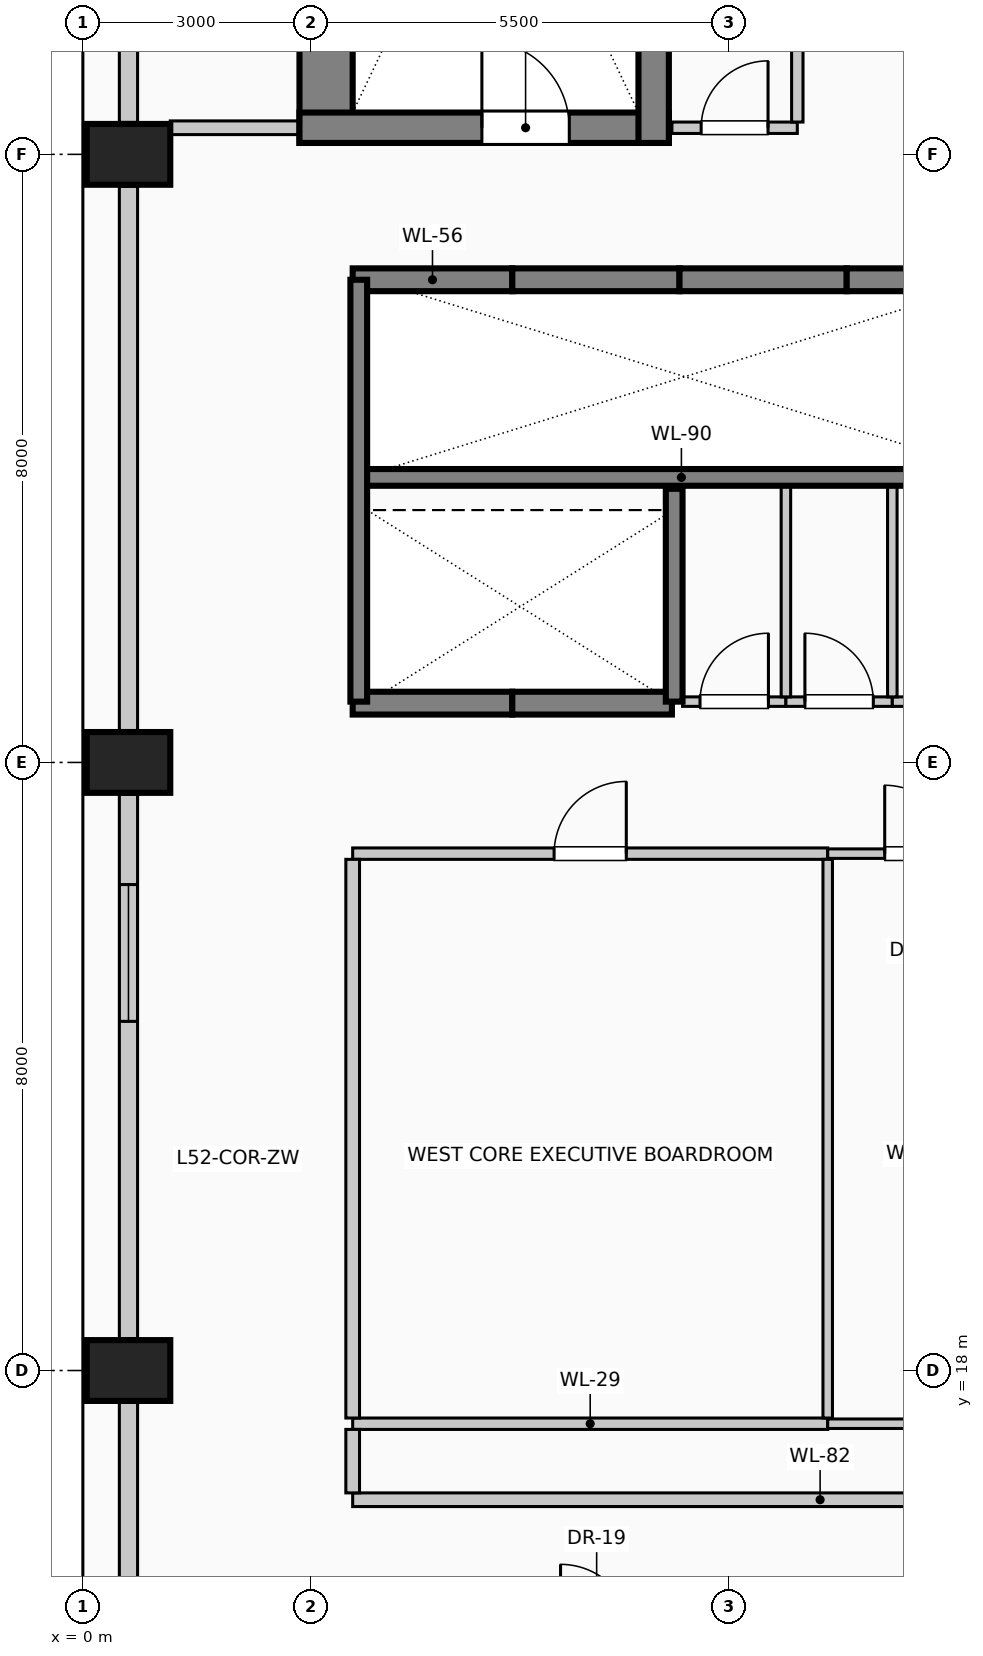
"""IFC4 building model, lengths in metres.
Left out: names, types, materials, properties, quantities, classifications, styles, units other than length and angle.
Written with IfcOpenShell. Run it as: python <this file> out.ifc"""

import sys

from ifc_helpers import new_model, si_unit, direction, frame, frame_2d, origin, origin_2d, place, context, subcontext, project, spatial, rectangle, extrude, element, fill, save


model = new_model("IFC4")
c1 = context("Model", 3, precision=1e-05, world=origin(), true_north=direction((0.0, 1.0)))
c2 = subcontext(c1, "Body", "Model", "MODEL_VIEW")
j1 = project(units=[si_unit("LENGTHUNIT", "METRE"), si_unit("PLANEANGLEUNIT", "RADIAN")], contexts=[c1])
p1 = place(None, origin())
s1 = spatial("IfcSite", under=j1, at=p1, CompositionType="ELEMENT")
p2 = place(p1, origin())
s2 = spatial("IfcBuilding", under=s1, at=p2, CompositionType="ELEMENT")
p3 = place(p2, frame((0.0, 0.0, 214.6)))
s3 = spatial("IfcBuildingStorey", under=s2, at=p3, CompositionType="ELEMENT", Elevation=214.6)
p4 = place(p3, frame((3.2, 34.15, 0.0), z_axis=(0.0, 0.0, 1.0), x_axis=(0.0, 1.0, 0.0)))
e1 = element("IfcWall", 1, at=p4, inside=s3, PredefinedType="SHEAR", context=c2, shape_type="SweptSolid", body=[
    extrude(rectangle(XDim=8.98, YDim=0.7, at=frame_2d((4.49, 0.0))), origin(), (0.0, 0.0, 1.0), 4.0),
])
p5 = place(p3, frame((2.85, 34.35, 0.0), z_axis=(0.0, 0.0, 1.0), x_axis=(1.0, 0.0, 0.0)))
e2 = element("IfcWall", 2, at=p5, inside=s3, PredefinedType="SHEAR", context=c2, shape_type="SweptSolid", body=[
    extrude(rectangle(XDim=4.86, YDim=0.4, at=frame_2d((2.43, 0.0))), origin(), (0.0, 0.0, 1.0), 4.0),
])
p6 = place(p5, frame((2.4, 0.0, 0.0)))
e3 = element("IfcOpeningElement", 3, at=p6, cuts=e2, PredefinedType="OPENING", context=c2, shape_type="SweptSolid", body=[
    extrude(rectangle(XDim=1.15, YDim=2.2, at=frame_2d((0.575, 1.1))), frame((0.0, 0.21, 0.0), z_axis=(0.0, -1.0, 0.0), x_axis=(1.0, 0.0, 0.0)), (0.0, 0.0, 1.0), 0.42),
])
p7 = place(p3, frame((7.51, 34.15, 0.0), z_axis=(0.0, 0.0, 1.0), x_axis=(0.0, 1.0, 0.0)))
e4 = element("IfcWall", 4, at=p7, inside=s3, PredefinedType="SHEAR", context=c2, shape_type="SweptSolid", body=[
    extrude(rectangle(XDim=8.98, YDim=0.4, at=frame_2d((4.49, 0.0))), origin(), (0.0, 0.0, 1.0), 4.0),
])
for number, where, z_axis, x_axis in (
    (5, (0.6, 18.0, 0.0), (0.0, 0.0, 1.0), (0.0, 1.0, 0.0)),
    (6, (0.6, 26.0, 0.0), (0.0, 0.0, 1.0), (0.0, 1.0, 0.0)),
    (7, (0.6, 34.0, 0.0), (0.0, 0.0, 1.0), (0.0, 1.0, 0.0)),
):
    element("IfcColumn", number, at=place(p3, frame(where, z_axis=z_axis, x_axis=x_axis)), inside=s3, PredefinedType="COLUMN", context=c2, shape_type="SweptSolid", body=[
        extrude(rectangle(XDim=0.8, YDim=1.1, at=origin_2d()), origin(), (0.0, 0.0, 1.0), 4.0),
    ])
p8 = place(p3, frame((0.6, 10.42, 0.0), z_axis=(0.0, 0.0, 1.0), x_axis=(0.0, 1.0, 0.0)))
e8 = element("IfcWall", 8, at=p8, inside=s3, PredefinedType="SOLIDWALL", context=c2, shape_type="SweptSolid", body=[
    extrude(rectangle(XDim=7.16, YDim=0.24, at=frame_2d((3.58, 0.0))), origin(), (0.0, 0.0, 1.0), 3.0),
])
p9 = place(p8, frame((1.187, 0.0, 0.42)))
e9 = element("IfcOpeningElement", 9, at=p9, cuts=e8, PredefinedType="OPENING", context=c2, shape_type="SweptSolid", body=[
    extrude(rectangle(XDim=1.8, YDim=2.2, at=frame_2d((0.9, 1.1))), frame((0.0, 0.13, 0.0), z_axis=(0.0, -1.0, 0.0), x_axis=(1.0, 0.0, 0.0)), (0.0, 0.0, 1.0), 0.26),
])
p10 = place(p3, frame((0.6, 18.42, 0.0), z_axis=(0.0, 0.0, 1.0), x_axis=(0.0, 1.0, 0.0)))
e10 = element("IfcWall", 10, at=p10, inside=s3, PredefinedType="SOLIDWALL", context=c2, shape_type="SweptSolid", body=[
    extrude(rectangle(XDim=7.16, YDim=0.24, at=frame_2d((3.58, 0.0))), origin(), (0.0, 0.0, 1.0), 3.0),
])
p11 = place(p10, frame((4.173, 0.0, 0.42)))
e11 = element("IfcOpeningElement", 11, at=p11, cuts=e10, PredefinedType="OPENING", context=c2, shape_type="SweptSolid", body=[
    extrude(rectangle(XDim=1.8, YDim=2.2, at=frame_2d((0.9, 1.1))), frame((0.0, 0.13, 0.0), z_axis=(0.0, -1.0, 0.0), x_axis=(1.0, 0.0, 0.0)), (0.0, 0.0, 1.0), 0.26),
])
p12 = place(p3, frame((0.6, 26.42, 0.0), z_axis=(0.0, 0.0, 1.0), x_axis=(0.0, 1.0, 0.0)))
e12 = element("IfcWall", 12, at=p12, inside=s3, PredefinedType="SOLIDWALL", context=c2, shape_type="SweptSolid", body=[
    extrude(rectangle(XDim=7.16, YDim=0.24, at=frame_2d((3.58, 0.0))), origin(), (0.0, 0.0, 1.0), 3.0),
])
p13 = place(p3, frame((0.6, 34.42, 0.0), z_axis=(0.0, 0.0, 1.0), x_axis=(0.0, 1.0, 0.0)))
e13 = element("IfcWall", 13, at=p13, inside=s3, PredefinedType="SOLIDWALL", context=c2, shape_type="SweptSolid", body=[
    extrude(rectangle(XDim=7.56, YDim=0.24, at=frame_2d((3.78, 0.0))), origin(), (0.0, 0.0, 1.0), 3.0),
])
p14 = place(p3, frame((3.55, 32.35, 0.0), z_axis=(0.0, 0.0, 1.0), x_axis=(1.0, 0.0, 0.0)))
e14 = element("IfcWall", 14, at=p14, inside=s3, PredefinedType="SOLIDWALL", context=c2, shape_type="SweptSolid", body=[
    extrude(rectangle(XDim=2.1, YDim=0.3, at=frame_2d((1.05, 0.0))), origin(), (0.0, 0.0, 1.0), 4.0),
])
p15 = place(p3, frame((5.65, 32.35, 0.0), z_axis=(0.0, 0.0, 1.0), x_axis=(1.0, 0.0, 0.0)))
e15 = element("IfcWall", 15, at=p15, inside=s3, PredefinedType="SOLIDWALL", context=c2, shape_type="SweptSolid", body=[
    extrude(rectangle(XDim=2.2, YDim=0.3, at=frame_2d((1.1, 0.0))), origin(), (0.0, 0.0, 1.0), 4.0),
])
p16 = place(p3, frame((7.85, 32.35, 0.0), z_axis=(0.0, 0.0, 1.0), x_axis=(1.0, 0.0, 0.0)))
e16 = element("IfcWall", 16, at=p16, inside=s3, PredefinedType="SOLIDWALL", context=c2, shape_type="SweptSolid", body=[
    extrude(rectangle(XDim=2.2, YDim=0.3, at=frame_2d((1.1, 0.0))), origin(), (0.0, 0.0, 1.0), 4.0),
])
p17 = place(p3, frame((10.05, 32.35, 0.0), z_axis=(0.0, 0.0, 1.0), x_axis=(1.0, 0.0, 0.0)))
e17 = element("IfcWall", 17, at=p17, inside=s3, PredefinedType="SOLIDWALL", context=c2, shape_type="SweptSolid", body=[
    extrude(rectangle(XDim=2.15, YDim=0.3, at=frame_2d((1.075, 0.0))), origin(), (0.0, 0.0, 1.0), 4.0),
])
p18 = place(p3, frame((5.65, 26.78, 0.0), z_axis=(0.0, 0.0, 1.0), x_axis=(-1.0, 0.0, 0.0)))
e18 = element("IfcWall", 18, at=p18, inside=s3, PredefinedType="SOLIDWALL", context=c2, shape_type="SweptSolid", body=[
    extrude(rectangle(XDim=2.1, YDim=0.3, at=frame_2d((1.05, 0.0))), origin(), (0.0, 0.0, 1.0), 4.0),
])
p19 = place(p3, frame((7.75, 26.78, 0.0), z_axis=(0.0, 0.0, 1.0), x_axis=(-1.0, 0.0, 0.0)))
e19 = element("IfcWall", 19, at=p19, inside=s3, PredefinedType="SOLIDWALL", context=c2, shape_type="SweptSolid", body=[
    extrude(rectangle(XDim=2.1, YDim=0.3, at=frame_2d((1.05, 0.0))), origin(), (0.0, 0.0, 1.0), 4.0),
])
p20 = place(p3, frame((3.55, 29.75, 0.0), z_axis=(0.0, 0.0, 1.0), x_axis=(1.0, 0.0, 0.0)))
e20 = element("IfcWall", 20, at=p20, inside=s3, PredefinedType="SOLIDWALL", context=c2, shape_type="SweptSolid", body=[
    extrude(rectangle(XDim=8.65, YDim=0.22, at=frame_2d((4.325, 0.0))), origin(), (0.0, 0.0, 1.0), 4.0),
])
p21 = place(p3, frame((3.63, 26.8, 0.0), z_axis=(0.0, 0.0, 1.0), x_axis=(0.0, 1.0, 0.0)))
e21 = element("IfcWall", 21, at=p21, inside=s3, PredefinedType="SOLIDWALL", context=c2, shape_type="SweptSolid", body=[
    extrude(rectangle(XDim=5.55, YDim=0.22, at=frame_2d((2.775, 0.0))), origin(), (0.0, 0.0, 1.0), 4.0),
])
p22 = place(p3, frame((7.78, 26.8, 0.0), z_axis=(0.0, 0.0, 1.0), x_axis=(0.0, 1.0, 0.0)))
e22 = element("IfcWall", 22, at=p22, inside=s3, PredefinedType="SOLIDWALL", context=c2, shape_type="SweptSolid", body=[
    extrude(rectangle(XDim=2.8, YDim=0.22, at=frame_2d((1.4, 0.0))), origin(), (0.0, 0.0, 1.0), 4.0),
])
p23 = place(p3, frame((3.55, 16.3, 0.0), z_axis=(0.0, 0.0, 1.0), x_axis=(1.0, 0.0, 0.0)))
e23 = element("IfcWall", 23, at=p23, inside=s3, PredefinedType="PARTITIONING", context=c2, shape_type="SweptSolid", body=[
    extrude(rectangle(XDim=12.3, YDim=0.18, at=frame_2d((6.15, 0.0))), origin(), (0.0, 0.0, 1.0), 3.75),
])
p24 = place(p3, frame((3.55, 17.3, 0.0), z_axis=(0.0, 0.0, 1.0), x_axis=(1.0, 0.0, 0.0)))
e24 = element("IfcWall", 24, at=p24, inside=s3, PredefinedType="PARTITIONING", context=c2, shape_type="SweptSolid", body=[
    extrude(rectangle(XDim=6.25, YDim=0.15, at=frame_2d((3.125, 0.0))), origin(), (0.0, 0.0, 1.0), 3.75),
])
p25 = place(p3, frame((9.8, 17.3, 0.0), z_axis=(0.0, 0.0, 1.0), x_axis=(1.0, 0.0, 0.0)))
e25 = element("IfcWall", 25, at=p25, inside=s3, PredefinedType="PARTITIONING", context=c2, shape_type="SweptSolid", body=[
    extrude(rectangle(XDim=6.05, YDim=0.125, at=frame_2d((3.025, 0.0))), origin(), (0.0, 0.0, 1.0), 3.75),
])
p26 = place(p3, frame((3.55, 24.8, 0.0), z_axis=(0.0, 0.0, 1.0), x_axis=(1.0, 0.0, 0.0)))
e26 = element("IfcWall", 26, at=p26, inside=s3, PredefinedType="PARTITIONING", context=c2, shape_type="SweptSolid", body=[
    extrude(rectangle(XDim=6.25, YDim=0.15, at=frame_2d((3.125, 0.0))), origin(), (0.0, 0.0, 1.0), 3.75),
])
p27 = place(p26, frame((2.65, 0.0, 0.0)))
e27 = element("IfcOpeningElement", 27, at=p27, cuts=e26, PredefinedType="OPENING", context=c2, shape_type="SweptSolid", body=[
    extrude(rectangle(XDim=0.95, YDim=2.15, at=frame_2d((0.475, 1.075))), frame((0.0, 0.085, 0.0), z_axis=(0.0, -1.0, 0.0), x_axis=(1.0, 0.0, 0.0)), (0.0, 0.0, 1.0), 0.17),
])
p28 = place(p3, frame((9.8, 24.8, 0.0), z_axis=(0.0, 0.0, 1.0), x_axis=(1.0, 0.0, 0.0)))
e28 = element("IfcWall", 28, at=p28, inside=s3, PredefinedType="PARTITIONING", context=c2, shape_type="SweptSolid", body=[
    extrude(rectangle(XDim=2.4, YDim=0.125, at=frame_2d((1.2, 0.0))), origin(), (0.0, 0.0, 1.0), 3.75),
])
p29 = place(p28, frame((0.75, 0.0, 0.0)))
e29 = element("IfcOpeningElement", 29, at=p29, cuts=e28, PredefinedType="OPENING", context=c2, shape_type="SweptSolid", body=[
    extrude(rectangle(XDim=0.9, YDim=2.1, at=frame_2d((0.45, 1.05))), frame((0.0, 0.073, 0.0), z_axis=(0.0, -1.0, 0.0), x_axis=(1.0, 0.0, 0.0)), (0.0, 0.0, 1.0), 0.145),
])
p30 = place(p3, frame((7.89, 26.8, 0.0), z_axis=(0.0, 0.0, 1.0), x_axis=(1.0, 0.0, 0.0)))
e30 = element("IfcWall", 30, at=p30, inside=s3, PredefinedType="PARTITIONING", context=c2, shape_type="SweptSolid", body=[
    extrude(rectangle(XDim=1.36, YDim=0.125, at=frame_2d((0.68, 0.0))), origin(), (0.0, 0.0, 1.0), 3.75),
])
p31 = place(p30, frame((0.23, 0.0, 0.0)))
e31 = element("IfcOpeningElement", 31, at=p31, cuts=e30, PredefinedType="OPENING", context=c2, shape_type="SweptSolid", body=[
    extrude(rectangle(XDim=0.9, YDim=2.1, at=frame_2d((0.45, 1.05))), frame((0.0, 0.073, 0.0), z_axis=(0.0, -1.0, 0.0), x_axis=(1.0, 0.0, 0.0)), (0.0, 0.0, 1.0), 0.145),
])
p32 = place(p3, frame((9.25, 26.8, 0.0), z_axis=(0.0, 0.0, 1.0), x_axis=(1.0, 0.0, 0.0)))
e32 = element("IfcWall", 32, at=p32, inside=s3, PredefinedType="PARTITIONING", context=c2, shape_type="SweptSolid", body=[
    extrude(rectangle(XDim=1.4, YDim=0.125, at=frame_2d((0.7, 0.0))), origin(), (0.0, 0.0, 1.0), 3.75),
])
p33 = place(p32, frame((0.25, 0.0, 0.0)))
e33 = element("IfcOpeningElement", 33, at=p33, cuts=e32, PredefinedType="OPENING", context=c2, shape_type="SweptSolid", body=[
    extrude(rectangle(XDim=0.9, YDim=2.1, at=frame_2d((0.45, 1.05))), frame((0.0, 0.073, 0.0), z_axis=(0.0, -1.0, 0.0), x_axis=(1.0, 0.0, 0.0)), (0.0, 0.0, 1.0), 0.145),
])
p34 = place(p3, frame((10.65, 26.8, 0.0), z_axis=(0.0, 0.0, 1.0), x_axis=(1.0, 0.0, 0.0)))
e34 = element("IfcWall", 34, at=p34, inside=s3, PredefinedType="PARTITIONING", context=c2, shape_type="SweptSolid", body=[
    extrude(rectangle(XDim=1.4, YDim=0.125, at=frame_2d((0.7, 0.0))), origin(), (0.0, 0.0, 1.0), 3.75),
])
p35 = place(p34, frame((0.24, 0.0, 0.0)))
e35 = element("IfcOpeningElement", 35, at=p35, cuts=e34, PredefinedType="OPENING", context=c2, shape_type="SweptSolid", body=[
    extrude(rectangle(XDim=0.92, YDim=2.1, at=frame_2d((0.46, 1.05))), frame((0.0, 0.073, 0.0), z_axis=(0.0, -1.0, 0.0), x_axis=(1.0, 0.0, 0.0)), (0.0, 0.0, 1.0), 0.145),
])
p36 = place(p3, frame((1.15, 34.35, 0.0), z_axis=(0.0, 0.0, 1.0), x_axis=(1.0, 0.0, 0.0)))
e36 = element("IfcWall", 36, at=p36, inside=s3, PredefinedType="PARTITIONING", context=c2, shape_type="SweptSolid", body=[
    extrude(rectangle(XDim=1.7, YDim=0.18, at=frame_2d((0.85, 0.0))), origin(), (0.0, 0.0, 1.0), 3.75),
])
p37 = place(p3, frame((7.75, 34.35, 0.0), z_axis=(0.0, 0.0, 1.0), x_axis=(1.0, 0.0, 0.0)))
e37 = element("IfcWall", 37, at=p37, inside=s3, PredefinedType="PARTITIONING", context=c2, shape_type="SweptSolid", body=[
    extrude(rectangle(XDim=1.65, YDim=0.15, at=frame_2d((0.825, 0.0))), origin(), (0.0, 0.0, 1.0), 3.75),
])
p38 = place(p37, frame((0.385, 0.0, 0.0)))
e38 = element("IfcOpeningElement", 38, at=p38, cuts=e37, PredefinedType="OPENING", context=c2, shape_type="SweptSolid", body=[
    extrude(rectangle(XDim=0.88, YDim=2.1, at=frame_2d((0.44, 1.05))), frame((0.0, 0.085, 0.0), z_axis=(0.0, -1.0, 0.0), x_axis=(1.0, 0.0, 0.0)), (0.0, 0.0, 1.0), 0.17),
])
p39 = place(p3, frame((3.55, 16.39, 0.0), z_axis=(0.0, 0.0, 1.0), x_axis=(0.0, 1.0, 0.0)))
e39 = element("IfcWall", 39, at=p39, inside=s3, PredefinedType="PARTITIONING", context=c2, shape_type="SweptSolid", body=[
    extrude(rectangle(XDim=0.835, YDim=0.18, at=frame_2d((0.417, 0.0))), origin(), (0.0, 0.0, 1.0), 3.75),
])
p40 = place(p3, frame((3.55, 17.375, 0.0), z_axis=(0.0, 0.0, 1.0), x_axis=(0.0, 1.0, 0.0)))
e40 = element("IfcWall", 40, at=p40, inside=s3, PredefinedType="PARTITIONING", context=c2, shape_type="SweptSolid", body=[
    extrude(rectangle(XDim=7.35, YDim=0.18, at=frame_2d((3.675, 0.0))), origin(), (0.0, 0.0, 1.0), 3.75),
])
p41 = place(p3, frame((9.25, 26.863, 0.0), z_axis=(0.0, 0.0, 1.0), x_axis=(0.0, 1.0, 0.0)))
e41 = element("IfcWall", 41, at=p41, inside=s3, PredefinedType="PARTITIONING", context=c2, shape_type="SweptSolid", body=[
    extrude(rectangle(XDim=2.777, YDim=0.125, at=frame_2d((1.389, 0.0))), origin(), (0.0, 0.0, 1.0), 3.75),
])
p42 = place(p3, frame((9.4, 34.425, 0.0), z_axis=(0.0, 0.0, 1.0), x_axis=(0.0, 1.0, 0.0)))
e42 = element("IfcWall", 42, at=p42, inside=s3, PredefinedType="PARTITIONING", context=c2, shape_type="SweptSolid", body=[
    extrude(rectangle(XDim=2.065, YDim=0.15, at=frame_2d((1.032, 0.0))), origin(), (0.0, 0.0, 1.0), 3.75),
])
p43 = place(p3, frame((9.8, 17.375, 0.0), z_axis=(0.0, 0.0, 1.0), x_axis=(0.0, 1.0, 0.0)))
e43 = element("IfcWall", 43, at=p43, inside=s3, PredefinedType="PARTITIONING", context=c2, shape_type="SweptSolid", body=[
    extrude(rectangle(XDim=7.35, YDim=0.125, at=frame_2d((3.675, 0.0))), origin(), (0.0, 0.0, 1.0), 3.75),
])
p44 = place(p3, frame((10.65, 26.863, 0.0), z_axis=(0.0, 0.0, 1.0), x_axis=(0.0, 1.0, 0.0)))
e44 = element("IfcWall", 44, at=p44, inside=s3, PredefinedType="PARTITIONING", context=c2, shape_type="SweptSolid", body=[
    extrude(rectangle(XDim=2.777, YDim=0.125, at=frame_2d((1.389, 0.0))), origin(), (0.0, 0.0, 1.0), 3.75),
])
p45 = place(p11, origin())
e45 = element("IfcWindow", 45, at=p45, inside=s3, PartitioningType="SINGLE_PANEL", PredefinedType="WINDOW", context=c2, shape_type="SweptSolid", body=[
    extrude(rectangle(XDim=1.8, YDim=2.2, at=frame_2d((0.9, 1.1))), frame((0.0, 0.03, 0.0), z_axis=(0.0, -1.0, 0.0), x_axis=(1.0, 0.0, 0.0)), (0.0, 0.0, 1.0), 0.06),
])
fill(e11, e45)
p46 = place(p6, origin())
e46 = element("IfcDoor", 46, at=p46, inside=s3, OperationType="SINGLE_SWING_LEFT", PredefinedType="DOOR", context=c2, shape_type="SweptSolid", body=[
    extrude(rectangle(XDim=1.15, YDim=2.2, at=frame_2d((0.575, 1.1))), frame((0.0, 0.025, 0.0), z_axis=(0.0, -1.0, 0.0), x_axis=(1.0, 0.0, 0.0)), (0.0, 0.0, 1.0), 0.05),
])
fill(e3, e46)
p47 = place(p27, origin())
e47 = element("IfcDoor", 47, at=p47, inside=s3, OperationType="SINGLE_SWING_RIGHT", PredefinedType="DOOR", context=c2, shape_type="SweptSolid", body=[
    extrude(rectangle(XDim=0.95, YDim=2.15, at=frame_2d((0.475, 1.075))), frame((0.0, 0.025, 0.0), z_axis=(0.0, -1.0, 0.0), x_axis=(1.0, 0.0, 0.0)), (0.0, 0.0, 1.0), 0.05),
])
fill(e27, e47)
p48 = place(p29, origin())
e48 = element("IfcDoor", 48, at=p48, inside=s3, OperationType="SINGLE_SWING_LEFT", PredefinedType="DOOR", context=c2, shape_type="SweptSolid", body=[
    extrude(rectangle(XDim=0.9, YDim=2.1, at=frame_2d((0.45, 1.05))), frame((0.0, 0.025, 0.0), z_axis=(0.0, -1.0, 0.0), x_axis=(1.0, 0.0, 0.0)), (0.0, 0.0, 1.0), 0.05),
])
fill(e29, e48)
p49 = place(p31, origin())
e49 = element("IfcDoor", 49, at=p49, inside=s3, OperationType="SINGLE_SWING_RIGHT", PredefinedType="DOOR", context=c2, shape_type="SweptSolid", body=[
    extrude(rectangle(XDim=0.9, YDim=2.1, at=frame_2d((0.45, 1.05))), frame((0.0, 0.025, 0.0), z_axis=(0.0, -1.0, 0.0), x_axis=(1.0, 0.0, 0.0)), (0.0, 0.0, 1.0), 0.05),
])
fill(e31, e49)
p50 = place(p33, origin())
e50 = element("IfcDoor", 50, at=p50, inside=s3, OperationType="SINGLE_SWING_LEFT", PredefinedType="DOOR", context=c2, shape_type="SweptSolid", body=[
    extrude(rectangle(XDim=0.9, YDim=2.1, at=frame_2d((0.45, 1.05))), frame((0.0, 0.025, 0.0), z_axis=(0.0, -1.0, 0.0), x_axis=(1.0, 0.0, 0.0)), (0.0, 0.0, 1.0), 0.05),
])
fill(e33, e50)
p51 = place(p38, origin())
e51 = element("IfcDoor", 51, at=p51, inside=s3, OperationType="SINGLE_SWING_RIGHT", PredefinedType="DOOR", context=c2, shape_type="SweptSolid", body=[
    extrude(rectangle(XDim=0.88, YDim=2.1, at=frame_2d((0.44, 1.05))), frame((0.0, 0.025, 0.0), z_axis=(0.0, -1.0, 0.0), x_axis=(1.0, 0.0, 0.0)), (0.0, 0.0, 1.0), 0.05),
])
fill(e38, e51)
save(model, sys.argv[1])
